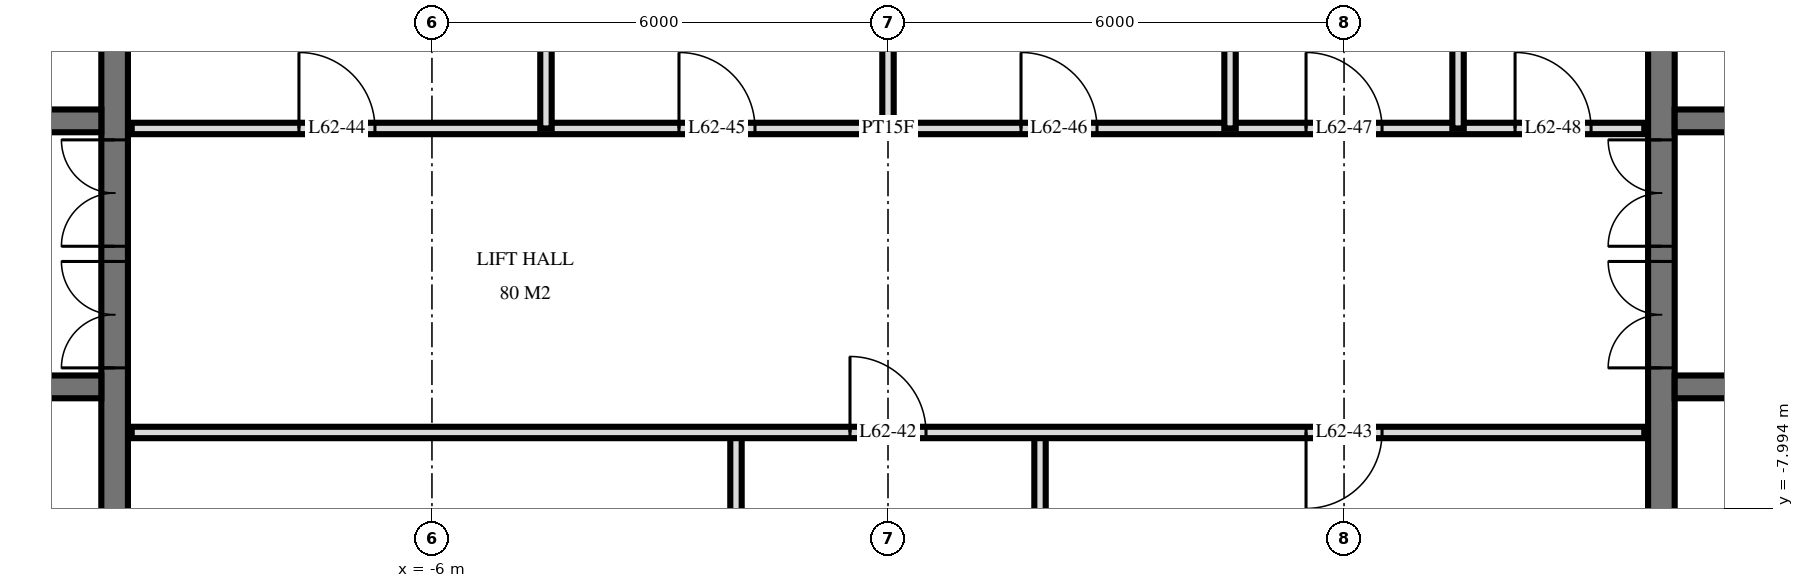
"""IFC4 building model, lengths in metres.
Left out: names, types, materials, properties, quantities, classifications, styles, units other than length and angle.
Written with IfcOpenShell. Run it as: python <this file> out.ifc"""

import sys

from ifc_helpers import new_model, si_unit, direction, frame, frame_2d, origin, place, context, subcontext, project, spatial, rectangle, extrude, element, fill, save


model = new_model("IFC4")
c1 = context("Model", 3, precision=1e-05, world=origin(), true_north=direction((0.0, 1.0)))
c2 = subcontext(c1, "Body", "Model", "MODEL_VIEW")
j1 = project(units=[si_unit("LENGTHUNIT", "METRE"), si_unit("PLANEANGLEUNIT", "RADIAN")], contexts=[c1])
p1 = place(None, origin())
s1 = spatial("IfcSite", under=j1, at=p1, CompositionType="ELEMENT")
p2 = place(p1, origin())
s2 = spatial("IfcBuilding", under=s1, at=p2, CompositionType="ELEMENT")
p3 = place(p2, frame((0.0, 0.0, 236.1)))
s3 = spatial("IfcBuildingStorey", under=s2, at=p3, CompositionType="ELEMENT", Elevation=236.1)
p4 = place(p3, frame((-10.175, -14.55, 0.0), z_axis=(0.0, 0.0, 1.0), x_axis=(0.0, 1.0, 0.0)))
e1 = element("IfcWall", 1, at=p4, inside=s3, PredefinedType="SHEAR", context=c2, shape_type="SweptSolid", body=[
    extrude(rectangle(XDim=14.1, YDim=0.35, at=frame_2d((7.05, 0.0))), origin(), (0.0, 0.0, 1.0), 3.5),
])
p5 = place(p4, frame((8.4, 0.0, 0.0)))
e2 = element("IfcOpeningElement", 2, at=p5, cuts=e1, PredefinedType="OPENING", context=c2, shape_type="SweptSolid", body=[
    extrude(rectangle(XDim=1.4, YDim=2.4, at=frame_2d((0.7, 1.2))), frame((0.0, 0.185, 0.0), z_axis=(0.0, -1.0, 0.0), x_axis=(1.0, 0.0, 0.0)), (0.0, 0.0, 1.0), 0.37),
])
p6 = place(p4, frame((10.0, 0.0, 0.0)))
e3 = element("IfcOpeningElement", 3, at=p6, cuts=e1, PredefinedType="OPENING", context=c2, shape_type="SweptSolid", body=[
    extrude(rectangle(XDim=1.4, YDim=2.4, at=frame_2d((0.7, 1.2))), frame((0.0, 0.185, 0.0), z_axis=(0.0, -1.0, 0.0), x_axis=(1.0, 0.0, 0.0)), (0.0, 0.0, 1.0), 0.37),
])
p7 = place(p4, frame((4.0, 0.0, 0.0)))
e4 = element("IfcOpeningElement", 4, at=p7, cuts=e1, PredefinedType="OPENING", context=c2, shape_type="SweptSolid", body=[
    extrude(rectangle(XDim=1.2, YDim=2.1, at=frame_2d((0.6, 1.05))), frame((0.0, 0.185, 0.0), z_axis=(0.0, -1.0, 0.0), x_axis=(1.0, 0.0, 0.0)), (0.0, 0.0, 1.0), 0.37),
])
p8 = place(p3, frame((-24.05, -2.9, 0.0), z_axis=(0.0, 0.0, 1.0), x_axis=(1.0, 0.0, 0.0)))
e5 = element("IfcWall", 5, at=p8, inside=s3, PredefinedType="SHEAR", context=c2, shape_type="SweptSolid", body=[
    extrude(rectangle(XDim=13.7, YDim=0.3, at=frame_2d((6.85, 0.0))), origin(), (0.0, 0.0, 1.0), 3.5),
])
p9 = place(p8, frame((0.55, 0.0, 0.0)))
e6 = element("IfcOpeningElement", 6, at=p9, cuts=e5, PredefinedType="OPENING", context=c2, shape_type="SweptSolid", body=[
    extrude(rectangle(XDim=1.1, YDim=2.1, at=frame_2d((0.55, 1.05))), frame((0.0, 0.16, 0.0), z_axis=(0.0, -1.0, 0.0), x_axis=(1.0, 0.0, 0.0)), (0.0, 0.0, 1.0), 0.32),
])
p10 = place(p8, frame((5.9, 0.0, 0.0)))
e7 = element("IfcOpeningElement", 7, at=p10, cuts=e5, PredefinedType="OPENING", context=c2, shape_type="SweptSolid", body=[
    extrude(rectangle(XDim=0.9, YDim=2.1, at=frame_2d((0.45, 1.05))), frame((0.0, 0.16, 0.0), z_axis=(0.0, -1.0, 0.0), x_axis=(1.0, 0.0, 0.0)), (0.0, 0.0, 1.0), 0.32),
])
p11 = place(p8, frame((11.85, 0.0, 0.0)))
e8 = element("IfcOpeningElement", 8, at=p11, cuts=e5, PredefinedType="OPENING", context=c2, shape_type="SweptSolid", body=[
    extrude(rectangle(XDim=1.0, YDim=2.1, at=frame_2d((0.5, 1.05))), frame((0.0, 0.16, 0.0), z_axis=(0.0, -1.0, 0.0), x_axis=(1.0, 0.0, 0.0)), (0.0, 0.0, 1.0), 0.32),
])
p12 = place(p8, frame((8.85, 0.0, 0.0)))
e9 = element("IfcOpeningElement", 9, at=p12, cuts=e5, PredefinedType="OPENING", context=c2, shape_type="SweptSolid", body=[
    extrude(rectangle(XDim=1.0, YDim=2.1, at=frame_2d((0.5, 1.05))), frame((0.0, 0.16, 0.0), z_axis=(0.0, -1.0, 0.0), x_axis=(1.0, 0.0, 0.0)), (0.0, 0.0, 1.0), 0.32),
])
p13 = place(p8, frame((3.0, 0.0, 0.0)))
e10 = element("IfcOpeningElement", 10, at=p13, cuts=e5, PredefinedType="OPENING", context=c2, shape_type="SweptSolid", body=[
    extrude(rectangle(XDim=1.0, YDim=2.1, at=frame_2d((0.5, 1.05))), frame((0.0, 0.16, 0.0), z_axis=(0.0, -1.0, 0.0), x_axis=(1.0, 0.0, 0.0)), (0.0, 0.0, 1.0), 0.32),
])
p14 = place(p3, frame((-24.05, -6.4, 0.0), z_axis=(0.0, 0.0, 1.0), x_axis=(1.0, 0.0, 0.0)))
e11 = element("IfcWall", 11, at=p14, inside=s3, PredefinedType="SHEAR", context=c2, shape_type="SweptSolid", body=[
    extrude(rectangle(XDim=13.7, YDim=0.3, at=frame_2d((6.85, 0.0))), origin(), (0.0, 0.0, 1.0), 3.5),
])
p15 = place(p14, frame((0.55, 0.0, 0.0)))
e12 = element("IfcOpeningElement", 12, at=p15, cuts=e11, PredefinedType="OPENING", context=c2, shape_type="SweptSolid", body=[
    extrude(rectangle(XDim=1.1, YDim=2.1, at=frame_2d((0.55, 1.05))), frame((0.0, 0.16, 0.0), z_axis=(0.0, -1.0, 0.0), x_axis=(1.0, 0.0, 0.0)), (0.0, 0.0, 1.0), 0.32),
])
p16 = place(p14, frame((5.8, 0.0, 0.0)))
e13 = element("IfcOpeningElement", 13, at=p16, cuts=e11, PredefinedType="OPENING", context=c2, shape_type="SweptSolid", body=[
    extrude(rectangle(XDim=1.1, YDim=2.1, at=frame_2d((0.55, 1.05))), frame((0.0, 0.16, 0.0), z_axis=(0.0, -1.0, 0.0), x_axis=(1.0, 0.0, 0.0)), (0.0, 0.0, 1.0), 0.32),
])
p17 = place(p3, frame((10.175, -14.55, 0.0), z_axis=(0.0, 0.0, 1.0), x_axis=(0.0, 1.0, 0.0)))
e14 = element("IfcWall", 14, at=p17, inside=s3, PredefinedType="SHEAR", context=c2, shape_type="SweptSolid", body=[
    extrude(rectangle(XDim=14.1, YDim=0.35, at=frame_2d((7.05, 0.0))), origin(), (0.0, 0.0, 1.0), 3.5),
])
p18 = place(p17, frame((8.4, 0.0, 0.0)))
e15 = element("IfcOpeningElement", 15, at=p18, cuts=e14, PredefinedType="OPENING", context=c2, shape_type="SweptSolid", body=[
    extrude(rectangle(XDim=1.4, YDim=2.4, at=frame_2d((0.7, 1.2))), frame((0.0, 0.185, 0.0), z_axis=(0.0, -1.0, 0.0), x_axis=(1.0, 0.0, 0.0)), (0.0, 0.0, 1.0), 0.37),
])
p19 = place(p17, frame((10.0, 0.0, 0.0)))
e16 = element("IfcOpeningElement", 16, at=p19, cuts=e14, PredefinedType="OPENING", context=c2, shape_type="SweptSolid", body=[
    extrude(rectangle(XDim=1.4, YDim=2.4, at=frame_2d((0.7, 1.2))), frame((0.0, 0.185, 0.0), z_axis=(0.0, -1.0, 0.0), x_axis=(1.0, 0.0, 0.0)), (0.0, 0.0, 1.0), 0.37),
])
p20 = place(p17, frame((4.0, 0.0, 0.0)))
e17 = element("IfcOpeningElement", 17, at=p20, cuts=e14, PredefinedType="OPENING", context=c2, shape_type="SweptSolid", body=[
    extrude(rectangle(XDim=1.2, YDim=2.1, at=frame_2d((0.6, 1.05))), frame((0.0, 0.185, 0.0), z_axis=(0.0, -1.0, 0.0), x_axis=(1.0, 0.0, 0.0)), (0.0, 0.0, 1.0), 0.37),
])
p21 = place(p3, frame((10.35, -2.9, 0.0), z_axis=(0.0, 0.0, 1.0), x_axis=(1.0, 0.0, 0.0)))
e18 = element("IfcWall", 18, at=p21, inside=s3, PredefinedType="SHEAR", context=c2, shape_type="SweptSolid", body=[
    extrude(rectangle(XDim=13.7, YDim=0.3, at=frame_2d((6.85, 0.0))), origin(), (0.0, 0.0, 1.0), 3.5),
])
p22 = place(p21, frame((12.05, 0.0, 0.0)))
e19 = element("IfcOpeningElement", 19, at=p22, cuts=e18, PredefinedType="OPENING", context=c2, shape_type="SweptSolid", body=[
    extrude(rectangle(XDim=1.1, YDim=2.1, at=frame_2d((0.55, 1.05))), frame((0.0, 0.16, 0.0), z_axis=(0.0, -1.0, 0.0), x_axis=(1.0, 0.0, 0.0)), (0.0, 0.0, 1.0), 0.32),
])
p23 = place(p21, frame((6.9, 0.0, 0.0)))
e20 = element("IfcOpeningElement", 20, at=p23, cuts=e18, PredefinedType="OPENING", context=c2, shape_type="SweptSolid", body=[
    extrude(rectangle(XDim=0.9, YDim=2.1, at=frame_2d((0.45, 1.05))), frame((0.0, 0.16, 0.0), z_axis=(0.0, -1.0, 0.0), x_axis=(1.0, 0.0, 0.0)), (0.0, 0.0, 1.0), 0.32),
])
p24 = place(p21, frame((0.85, 0.0, 0.0)))
e21 = element("IfcOpeningElement", 21, at=p24, cuts=e18, PredefinedType="OPENING", context=c2, shape_type="SweptSolid", body=[
    extrude(rectangle(XDim=1.0, YDim=2.1, at=frame_2d((0.5, 1.05))), frame((0.0, 0.16, 0.0), z_axis=(0.0, -1.0, 0.0), x_axis=(1.0, 0.0, 0.0)), (0.0, 0.0, 1.0), 0.32),
])
p25 = place(p21, frame((3.85, 0.0, 0.0)))
e22 = element("IfcOpeningElement", 22, at=p25, cuts=e18, PredefinedType="OPENING", context=c2, shape_type="SweptSolid", body=[
    extrude(rectangle(XDim=1.0, YDim=2.1, at=frame_2d((0.5, 1.05))), frame((0.0, 0.16, 0.0), z_axis=(0.0, -1.0, 0.0), x_axis=(1.0, 0.0, 0.0)), (0.0, 0.0, 1.0), 0.32),
])
p26 = place(p21, frame((9.7, 0.0, 0.0)))
e23 = element("IfcOpeningElement", 23, at=p26, cuts=e18, PredefinedType="OPENING", context=c2, shape_type="SweptSolid", body=[
    extrude(rectangle(XDim=1.0, YDim=2.1, at=frame_2d((0.5, 1.05))), frame((0.0, 0.16, 0.0), z_axis=(0.0, -1.0, 0.0), x_axis=(1.0, 0.0, 0.0)), (0.0, 0.0, 1.0), 0.32),
])
p27 = place(p3, frame((10.35, -6.4, 0.0), z_axis=(0.0, 0.0, 1.0), x_axis=(1.0, 0.0, 0.0)))
e24 = element("IfcWall", 24, at=p27, inside=s3, PredefinedType="SHEAR", context=c2, shape_type="SweptSolid", body=[
    extrude(rectangle(XDim=13.7, YDim=0.3, at=frame_2d((6.85, 0.0))), origin(), (0.0, 0.0, 1.0), 3.5),
])
p28 = place(p27, frame((12.05, 0.0, 0.0)))
e25 = element("IfcOpeningElement", 25, at=p28, cuts=e24, PredefinedType="OPENING", context=c2, shape_type="SweptSolid", body=[
    extrude(rectangle(XDim=1.1, YDim=2.1, at=frame_2d((0.55, 1.05))), frame((0.0, 0.16, 0.0), z_axis=(0.0, -1.0, 0.0), x_axis=(1.0, 0.0, 0.0)), (0.0, 0.0, 1.0), 0.32),
])
p29 = place(p27, frame((6.8, 0.0, 0.0)))
e26 = element("IfcOpeningElement", 26, at=p29, cuts=e24, PredefinedType="OPENING", context=c2, shape_type="SweptSolid", body=[
    extrude(rectangle(XDim=1.1, YDim=2.1, at=frame_2d((0.55, 1.05))), frame((0.0, 0.16, 0.0), z_axis=(0.0, -1.0, 0.0), x_axis=(1.0, 0.0, 0.0)), (0.0, 0.0, 1.0), 0.32),
])
for number, where, z_axis, x_axis in (
    (27, (7.5, -3.0, 0.0), (0.0, 0.0, 1.0), (0.0, 1.0, 0.0)),
    (28, (4.5, -3.0, 0.0), (0.0, 0.0, 1.0), (0.0, 1.0, 0.0)),
):
    element("IfcWall", number, at=place(p3, frame(where, z_axis=z_axis, x_axis=x_axis)), inside=s3, PredefinedType="PLUMBINGWALL", context=c2, shape_type="SweptSolid", body=[
        extrude(rectangle(XDim=4.02, YDim=0.15, at=frame_2d((2.01, 0.0))), origin(), (0.0, 0.0, 1.0), 3.22),
    ])
p30 = place(p3, frame((2.0, -11.0, 0.0), z_axis=(0.0, 0.0, 1.0), x_axis=(0.0, 1.0, 0.0)))
e29 = element("IfcWall", 29, at=p30, inside=s3, PredefinedType="PARTITIONING", context=c2, shape_type="SweptSolid", body=[
    extrude(rectangle(XDim=4.0, YDim=0.15, at=frame_2d((2.0, 0.0))), origin(), (0.0, 0.0, 1.0), 3.22),
])
p31 = place(p3, frame((0.0, -3.0, 0.0), z_axis=(0.0, 0.0, 1.0), x_axis=(0.0, 1.0, 0.0)))
e30 = element("IfcWall", 30, at=p31, inside=s3, PredefinedType="PARTITIONING", context=c2, shape_type="SweptSolid", body=[
    extrude(rectangle(XDim=4.02, YDim=0.15, at=frame_2d((2.01, 0.0))), origin(), (0.0, 0.0, 1.0), 3.22),
])
p32 = place(p3, frame((-2.0, -11.0, 0.0), z_axis=(0.0, 0.0, 1.0), x_axis=(0.0, 1.0, 0.0)))
e31 = element("IfcWall", 31, at=p32, inside=s3, PredefinedType="PARTITIONING", context=c2, shape_type="SweptSolid", body=[
    extrude(rectangle(XDim=4.0, YDim=0.15, at=frame_2d((2.0, 0.0))), origin(), (0.0, 0.0, 1.0), 3.22),
])
p33 = place(p3, frame((-4.5, -3.0, 0.0), z_axis=(0.0, 0.0, 1.0), x_axis=(0.0, 1.0, 0.0)))
e32 = element("IfcWall", 32, at=p33, inside=s3, PredefinedType="PARTITIONING", context=c2, shape_type="SweptSolid", body=[
    extrude(rectangle(XDim=4.02, YDim=0.15, at=frame_2d((2.01, 0.0))), origin(), (0.0, 0.0, 1.0), 3.22),
])
p34 = place(p3, frame((-9.95, -7.0, 0.0), z_axis=(0.0, 0.0, 1.0), x_axis=(1.0, 0.0, 0.0)))
e33 = element("IfcWall", 33, at=p34, inside=s3, PredefinedType="PARTITIONING", context=c2, shape_type="SweptSolid", body=[
    extrude(rectangle(XDim=19.9, YDim=0.15, at=frame_2d((9.95, 0.0))), origin(), (0.0, 0.0, 1.0), 3.22),
])
p35 = place(p34, frame((9.45, 0.0, 0.0)))
e34 = element("IfcOpeningElement", 34, at=p35, cuts=e33, PredefinedType="OPENING", context=c2, shape_type="SweptSolid", body=[
    extrude(rectangle(XDim=1.0, YDim=2.1, at=frame_2d((0.5, 1.05))), frame((0.0, 0.085, 0.0), z_axis=(0.0, -1.0, 0.0), x_axis=(1.0, 0.0, 0.0)), (0.0, 0.0, 1.0), 0.17),
])
p36 = place(p34, frame((15.45, 0.0, 0.0)))
e35 = element("IfcOpeningElement", 35, at=p36, cuts=e33, PredefinedType="OPENING", context=c2, shape_type="SweptSolid", body=[
    extrude(rectangle(XDim=1.0, YDim=2.1, at=frame_2d((0.5, 1.05))), frame((0.0, 0.085, 0.0), z_axis=(0.0, -1.0, 0.0), x_axis=(1.0, 0.0, 0.0)), (0.0, 0.0, 1.0), 0.17),
])
p37 = place(p3, frame((-9.95, -3.0, 0.0), z_axis=(0.0, 0.0, 1.0), x_axis=(1.0, 0.0, 0.0)))
e36 = element("IfcWall", 36, at=p37, inside=s3, PredefinedType="PARTITIONING", context=c2, shape_type="SweptSolid", body=[
    extrude(rectangle(XDim=19.9, YDim=0.15, at=frame_2d((9.95, 0.0))), origin(), (0.0, 0.0, 1.0), 3.22),
])
p38 = place(p37, frame((2.2, 0.0, 0.0)))
e37 = element("IfcOpeningElement", 37, at=p38, cuts=e36, PredefinedType="OPENING", context=c2, shape_type="SweptSolid", body=[
    extrude(rectangle(XDim=1.0, YDim=2.1, at=frame_2d((0.5, 1.05))), frame((0.0, 0.085, 0.0), z_axis=(0.0, -1.0, 0.0), x_axis=(1.0, 0.0, 0.0)), (0.0, 0.0, 1.0), 0.17),
])
p39 = place(p37, frame((7.2, 0.0, 0.0)))
e38 = element("IfcOpeningElement", 38, at=p39, cuts=e36, PredefinedType="OPENING", context=c2, shape_type="SweptSolid", body=[
    extrude(rectangle(XDim=1.0, YDim=2.1, at=frame_2d((0.5, 1.05))), frame((0.0, 0.085, 0.0), z_axis=(0.0, -1.0, 0.0), x_axis=(1.0, 0.0, 0.0)), (0.0, 0.0, 1.0), 0.17),
])
p40 = place(p37, frame((11.7, 0.0, 0.0)))
e39 = element("IfcOpeningElement", 39, at=p40, cuts=e36, PredefinedType="OPENING", context=c2, shape_type="SweptSolid", body=[
    extrude(rectangle(XDim=1.0, YDim=2.1, at=frame_2d((0.5, 1.05))), frame((0.0, 0.085, 0.0), z_axis=(0.0, -1.0, 0.0), x_axis=(1.0, 0.0, 0.0)), (0.0, 0.0, 1.0), 0.17),
])
p41 = place(p37, frame((15.45, 0.0, 0.0)))
e40 = element("IfcOpeningElement", 40, at=p41, cuts=e36, PredefinedType="OPENING", context=c2, shape_type="SweptSolid", body=[
    extrude(rectangle(XDim=1.0, YDim=2.1, at=frame_2d((0.5, 1.05))), frame((0.0, 0.085, 0.0), z_axis=(0.0, -1.0, 0.0), x_axis=(1.0, 0.0, 0.0)), (0.0, 0.0, 1.0), 0.17),
])
p42 = place(p37, frame((18.2, 0.0, 0.0)))
e41 = element("IfcOpeningElement", 41, at=p42, cuts=e36, PredefinedType="OPENING", context=c2, shape_type="SweptSolid", body=[
    extrude(rectangle(XDim=1.0, YDim=2.1, at=frame_2d((0.5, 1.05))), frame((0.0, 0.085, 0.0), z_axis=(0.0, -1.0, 0.0), x_axis=(1.0, 0.0, 0.0)), (0.0, 0.0, 1.0), 0.17),
])
p43 = place(p5, origin())
e42 = element("IfcDoor", 42, at=p43, inside=s3, OperationType="DOUBLE_DOOR_SINGLE_SWING", PredefinedType="DOOR", context=c2, shape_type="SweptSolid", body=[
    extrude(rectangle(XDim=1.4, YDim=2.4, at=frame_2d((0.7, 1.2))), frame((0.0, 0.025, 0.0), z_axis=(0.0, -1.0, 0.0), x_axis=(1.0, 0.0, 0.0)), (0.0, 0.0, 1.0), 0.05),
])
fill(e2, e42)
p44 = place(p6, origin())
e43 = element("IfcDoor", 43, at=p44, inside=s3, OperationType="DOUBLE_DOOR_SINGLE_SWING", PredefinedType="DOOR", context=c2, shape_type="SweptSolid", body=[
    extrude(rectangle(XDim=1.4, YDim=2.4, at=frame_2d((0.7, 1.2))), frame((0.0, 0.025, 0.0), z_axis=(0.0, -1.0, 0.0), x_axis=(1.0, 0.0, 0.0)), (0.0, 0.0, 1.0), 0.05),
])
fill(e3, e43)
p45 = place(p18, origin())
e44 = element("IfcDoor", 44, at=p45, inside=s3, OperationType="DOUBLE_DOOR_SINGLE_SWING", PredefinedType="DOOR", context=c2, shape_type="SweptSolid", body=[
    extrude(rectangle(XDim=1.4, YDim=2.4, at=frame_2d((0.7, 1.2))), frame((0.0, 0.025, 0.0), z_axis=(0.0, -1.0, 0.0), x_axis=(1.0, 0.0, 0.0)), (0.0, 0.0, 1.0), 0.05),
])
fill(e15, e44)
p46 = place(p19, origin())
e45 = element("IfcDoor", 45, at=p46, inside=s3, OperationType="DOUBLE_DOOR_SINGLE_SWING", PredefinedType="DOOR", context=c2, shape_type="SweptSolid", body=[
    extrude(rectangle(XDim=1.4, YDim=2.4, at=frame_2d((0.7, 1.2))), frame((0.0, 0.025, 0.0), z_axis=(0.0, -1.0, 0.0), x_axis=(1.0, 0.0, 0.0)), (0.0, 0.0, 1.0), 0.05),
])
fill(e16, e45)
p47 = place(p35, origin())
e46 = element("IfcDoor", 46, at=p47, inside=s3, OperationType="SINGLE_SWING_RIGHT", PredefinedType="DOOR", context=c2, shape_type="SweptSolid", body=[
    extrude(rectangle(XDim=1.0, YDim=2.1, at=frame_2d((0.5, 1.05))), frame((0.0, 0.025, 0.0), z_axis=(0.0, -1.0, 0.0), x_axis=(1.0, 0.0, 0.0)), (0.0, 0.0, 1.0), 0.05),
])
fill(e34, e46)
p48 = place(p36, frame((0.5, 0.0, 0.0), z_axis=(0.0, 0.0, 1.0), x_axis=(-1.0, 0.0, 0.0)))
e47 = element("IfcDoor", 47, at=p48, inside=s3, OperationType="SINGLE_SWING_LEFT", PredefinedType="DOOR", context=c2, shape_type="SweptSolid", body=[
    extrude(rectangle(XDim=1.0, YDim=2.1, at=frame_2d((0.0, 1.05))), frame((0.0, -0.025, 0.0), z_axis=(0.0, 1.0, 0.0), x_axis=(-1.0, 0.0, 0.0)), (0.0, 0.0, 1.0), 0.05),
])
fill(e35, e47)
p49 = place(p38, origin())
e48 = element("IfcDoor", 48, at=p49, inside=s3, OperationType="SINGLE_SWING_RIGHT", PredefinedType="DOOR", context=c2, shape_type="SweptSolid", body=[
    extrude(rectangle(XDim=1.0, YDim=2.1, at=frame_2d((0.5, 1.05))), frame((0.0, 0.025, 0.0), z_axis=(0.0, -1.0, 0.0), x_axis=(1.0, 0.0, 0.0)), (0.0, 0.0, 1.0), 0.05),
])
fill(e37, e48)
p50 = place(p39, origin())
e49 = element("IfcDoor", 49, at=p50, inside=s3, OperationType="SINGLE_SWING_RIGHT", PredefinedType="DOOR", context=c2, shape_type="SweptSolid", body=[
    extrude(rectangle(XDim=1.0, YDim=2.1, at=frame_2d((0.5, 1.05))), frame((0.0, 0.025, 0.0), z_axis=(0.0, -1.0, 0.0), x_axis=(1.0, 0.0, 0.0)), (0.0, 0.0, 1.0), 0.05),
])
fill(e38, e49)
p51 = place(p40, origin())
e50 = element("IfcDoor", 50, at=p51, inside=s3, OperationType="SINGLE_SWING_RIGHT", PredefinedType="DOOR", context=c2, shape_type="SweptSolid", body=[
    extrude(rectangle(XDim=1.0, YDim=2.1, at=frame_2d((0.5, 1.05))), frame((0.0, 0.025, 0.0), z_axis=(0.0, -1.0, 0.0), x_axis=(1.0, 0.0, 0.0)), (0.0, 0.0, 1.0), 0.05),
])
fill(e39, e50)
p52 = place(p41, origin())
e51 = element("IfcDoor", 51, at=p52, inside=s3, OperationType="SINGLE_SWING_RIGHT", PredefinedType="DOOR", context=c2, shape_type="SweptSolid", body=[
    extrude(rectangle(XDim=1.0, YDim=2.1, at=frame_2d((0.5, 1.05))), frame((0.0, 0.025, 0.0), z_axis=(0.0, -1.0, 0.0), x_axis=(1.0, 0.0, 0.0)), (0.0, 0.0, 1.0), 0.05),
])
fill(e40, e51)
p53 = place(p42, origin())
e52 = element("IfcDoor", 52, at=p53, inside=s3, OperationType="SINGLE_SWING_RIGHT", PredefinedType="DOOR", context=c2, shape_type="SweptSolid", body=[
    extrude(rectangle(XDim=1.0, YDim=2.1, at=frame_2d((0.5, 1.05))), frame((0.0, 0.025, 0.0), z_axis=(0.0, -1.0, 0.0), x_axis=(1.0, 0.0, 0.0)), (0.0, 0.0, 1.0), 0.05),
])
fill(e41, e52)
save(model, sys.argv[1])
